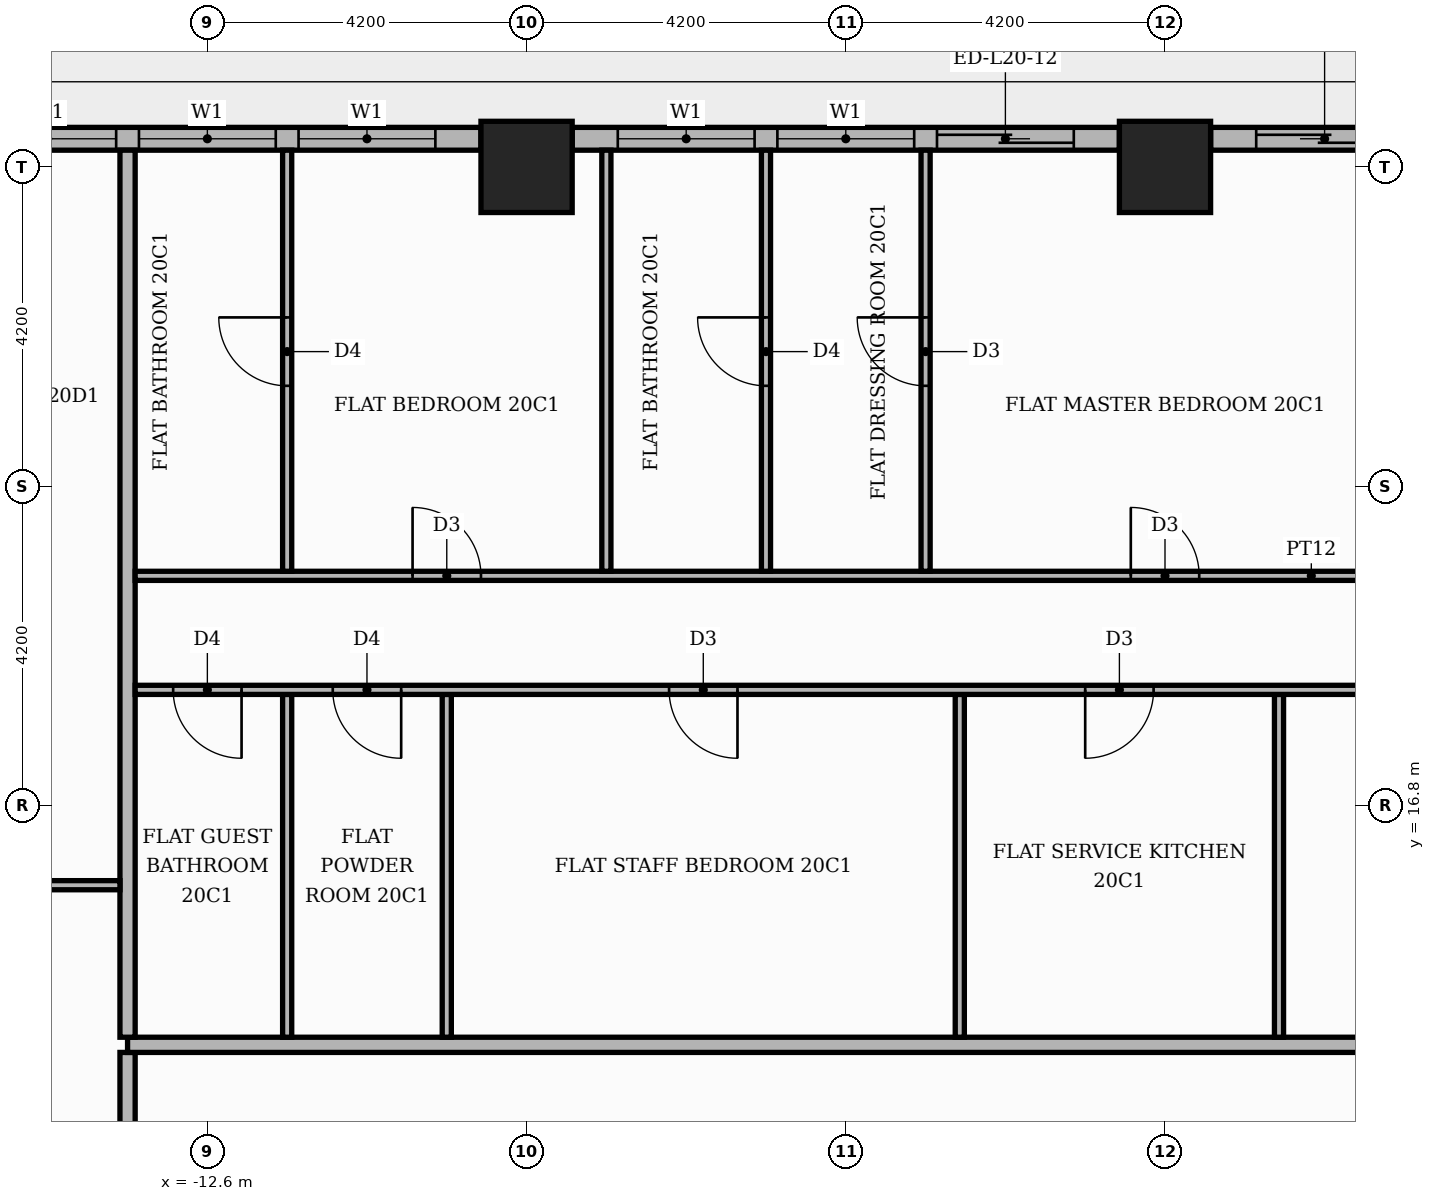
"""IFC4 building model, lengths in metres.
Left out: names, types, materials, properties, quantities, classifications, styles, units other than length and angle.
Written with IfcOpenShell. Run it as: python <this file> out.ifc"""

import sys

from ifc_helpers import new_model, si_unit, direction, frame, frame_2d, origin, origin_2d, place, context, subcontext, project, spatial, rectangle, extrude, element, fill, save


model = new_model("IFC4")
c1 = context("Model", 3, precision=1e-05, world=origin(), true_north=direction((0.0, 1.0)))
c2 = subcontext(c1, "Body", "Model", "MODEL_VIEW")
j1 = project(units=[si_unit("LENGTHUNIT", "METRE"), si_unit("PLANEANGLEUNIT", "RADIAN")], contexts=[c1])
p1 = place(None, origin())
s1 = spatial("IfcSite", under=j1, at=p1, CompositionType="ELEMENT")
p2 = place(p1, origin())
s2 = spatial("IfcBuilding", under=s1, at=p2, CompositionType="ELEMENT")
p3 = place(p2, frame((0.0, 0.0, 87.0)))
s3 = spatial("IfcBuildingStorey", under=s2, at=p3, CompositionType="ELEMENT", Elevation=87.0)
for number, where, z_axis, x_axis in (
    (1, (0.0, 25.2, 0.0), (0.0, 0.0, 1.0), (1.0, 0.0, 0.0)),
    (2, (-8.4, 25.2, 0.0), (0.0, 0.0, 1.0), (1.0, 0.0, 0.0)),
):
    element("IfcColumn", number, at=place(p3, frame(where, z_axis=z_axis, x_axis=x_axis)), inside=s3, PredefinedType="COLUMN", context=c2, shape_type="SweptSolid", body=[
        extrude(rectangle(XDim=1.2, YDim=1.2, at=origin_2d()), origin(), (0.0, 0.0, 1.0), 3.9),
    ])
p4 = place(p3, frame((7.8, 25.57, 0.0), z_axis=(0.0, 0.0, 1.0), x_axis=(-1.0, 0.0, 0.0)))
e3 = element("IfcWall", 3, at=p4, inside=s3, PredefinedType="STANDARD", context=c2, shape_type="SweptSolid", body=[
    extrude(rectangle(XDim=7.2, YDim=0.3, at=frame_2d((3.6, 0.0))), origin(), (0.0, 0.0, 1.0), 3.48),
])
p5 = place(p4, frame((0.6, 0.0, 0.0)))
e4 = element("IfcOpeningElement", 4, at=p5, cuts=e3, PredefinedType="OPENING", context=c2, shape_type="SweptSolid", body=[
    extrude(rectangle(XDim=3.9, YDim=2.4, at=frame_2d((1.95, 1.2))), frame((0.0, 0.16, 0.0), z_axis=(0.0, -1.0, 0.0), x_axis=(1.0, 0.0, 0.0)), (0.0, 0.0, 1.0), 0.32),
])
p6 = place(p4, frame((4.8, 0.0, 0.0)))
e5 = element("IfcOpeningElement", 5, at=p6, cuts=e3, PredefinedType="OPENING", context=c2, shape_type="SweptSolid", body=[
    extrude(rectangle(XDim=1.8, YDim=2.4, at=frame_2d((0.9, 1.2))), frame((0.0, 0.16, 0.0), z_axis=(0.0, -1.0, 0.0), x_axis=(1.0, 0.0, 0.0)), (0.0, 0.0, 1.0), 0.32),
])
p7 = place(p3, frame((-0.6, 25.57, 0.0), z_axis=(0.0, 0.0, 1.0), x_axis=(-1.0, 0.0, 0.0)))
e6 = element("IfcWall", 6, at=p7, inside=s3, PredefinedType="STANDARD", context=c2, shape_type="SweptSolid", body=[
    extrude(rectangle(XDim=7.2, YDim=0.3, at=frame_2d((3.6, 0.0))), origin(), (0.0, 0.0, 1.0), 3.48),
])
p8 = place(p7, frame((0.6, 0.0, 0.0)))
e7 = element("IfcOpeningElement", 7, at=p8, cuts=e6, PredefinedType="OPENING", context=c2, shape_type="SweptSolid", body=[
    extrude(rectangle(XDim=1.8, YDim=2.4, at=frame_2d((0.9, 1.2))), frame((0.0, 0.16, 0.0), z_axis=(0.0, -1.0, 0.0), x_axis=(1.0, 0.0, 0.0)), (0.0, 0.0, 1.0), 0.32),
])
p9 = place(p7, frame((2.7, 0.0, 0.9)))
e8 = element("IfcOpeningElement", 8, at=p9, cuts=e6, PredefinedType="OPENING", context=c2, shape_type="SweptSolid", body=[
    extrude(rectangle(XDim=1.8, YDim=2.1, at=frame_2d((0.9, 1.05))), frame((0.0, 0.16, 0.0), z_axis=(0.0, -1.0, 0.0), x_axis=(1.0, 0.0, 0.0)), (0.0, 0.0, 1.0), 0.32),
])
p10 = place(p7, frame((4.8, 0.0, 0.9)))
e9 = element("IfcOpeningElement", 9, at=p10, cuts=e6, PredefinedType="OPENING", context=c2, shape_type="SweptSolid", body=[
    extrude(rectangle(XDim=1.8, YDim=2.1, at=frame_2d((0.9, 1.05))), frame((0.0, 0.16, 0.0), z_axis=(0.0, -1.0, 0.0), x_axis=(1.0, 0.0, 0.0)), (0.0, 0.0, 1.0), 0.32),
])
p11 = place(p3, frame((-9.0, 25.57, 0.0), z_axis=(0.0, 0.0, 1.0), x_axis=(-1.0, 0.0, 0.0)))
e10 = element("IfcWall", 10, at=p11, inside=s3, PredefinedType="STANDARD", context=c2, shape_type="SweptSolid", body=[
    extrude(rectangle(XDim=7.2, YDim=0.3, at=frame_2d((3.6, 0.0))), origin(), (0.0, 0.0, 1.0), 3.48),
])
p12 = place(p11, frame((0.6, 0.0, 0.9)))
e11 = element("IfcOpeningElement", 11, at=p12, cuts=e10, PredefinedType="OPENING", context=c2, shape_type="SweptSolid", body=[
    extrude(rectangle(XDim=1.8, YDim=2.1, at=frame_2d((0.9, 1.05))), frame((0.0, 0.16, 0.0), z_axis=(0.0, -1.0, 0.0), x_axis=(1.0, 0.0, 0.0)), (0.0, 0.0, 1.0), 0.32),
])
p13 = place(p11, frame((2.7, 0.0, 0.9)))
e12 = element("IfcOpeningElement", 12, at=p13, cuts=e10, PredefinedType="OPENING", context=c2, shape_type="SweptSolid", body=[
    extrude(rectangle(XDim=1.8, YDim=2.1, at=frame_2d((0.9, 1.05))), frame((0.0, 0.16, 0.0), z_axis=(0.0, -1.0, 0.0), x_axis=(1.0, 0.0, 0.0)), (0.0, 0.0, 1.0), 0.32),
])
p14 = place(p11, frame((4.8, 0.0, 0.9)))
e13 = element("IfcOpeningElement", 13, at=p14, cuts=e10, PredefinedType="OPENING", context=c2, shape_type="SweptSolid", body=[
    extrude(rectangle(XDim=1.8, YDim=2.1, at=frame_2d((0.9, 1.05))), frame((0.0, 0.16, 0.0), z_axis=(0.0, -1.0, 0.0), x_axis=(1.0, 0.0, 0.0)), (0.0, 0.0, 1.0), 0.32),
])
p15 = place(p3, frame((-13.65, -13.55, 0.0), z_axis=(0.0, 0.0, 1.0), x_axis=(0.0, 1.0, 0.0)))
e14 = element("IfcWall", 14, at=p15, inside=s3, PredefinedType="PARTITIONING", context=c2, shape_type="SweptSolid", body=[
    extrude(rectangle(XDim=27.1, YDim=0.2, at=frame_2d((13.55, 0.0))), origin(), (0.0, 0.0, 1.0), 3.48),
])
p16 = place(p15, frame((24.55, 0.0, 0.0)))
e15 = element("IfcOpeningElement", 15, at=p16, cuts=e14, PredefinedType="OPENING", context=c2, shape_type="SweptSolid", body=[
    extrude(rectangle(XDim=1.1, YDim=2.4, at=frame_2d((0.55, 1.2))), frame((0.0, 0.11, 0.0), z_axis=(0.0, -1.0, 0.0), x_axis=(1.0, 0.0, 0.0)), (0.0, 0.0, 1.0), 0.22),
])
p17 = place(p3, frame((-13.65, 13.65, 0.0), z_axis=(0.0, 0.0, 1.0), x_axis=(1.0, 0.0, 0.0)))
e16 = element("IfcWall", 16, at=p17, inside=s3, PredefinedType="PARTITIONING", context=c2, shape_type="SweptSolid", body=[
    extrude(rectangle(XDim=39.07, YDim=0.2, at=frame_2d((19.535, 0.0))), origin(), (0.0, 0.0, 1.0), 3.48),
])
p18 = place(p17, frame((23.6, 0.0, 0.0)))
e17 = element("IfcOpeningElement", 17, at=p18, cuts=e16, PredefinedType="OPENING", context=c2, shape_type="SweptSolid", body=[
    extrude(rectangle(XDim=1.1, YDim=2.4, at=frame_2d((0.55, 1.2))), frame((0.0, 0.11, 0.0), z_axis=(0.0, -1.0, 0.0), x_axis=(1.0, 0.0, 0.0)), (0.0, 0.0, 1.0), 0.22),
])
p19 = place(p3, frame((-13.65, 13.75, 0.0), z_axis=(0.0, 0.0, 1.0), x_axis=(0.0, 1.0, 0.0)))
e18 = element("IfcWall", 18, at=p19, inside=s3, PredefinedType="PARTITIONING", context=c2, shape_type="SweptSolid", body=[
    extrude(rectangle(XDim=11.67, YDim=0.2, at=frame_2d((5.835, 0.0))), origin(), (0.0, 0.0, 1.0), 3.48),
])
for number, where, z_axis, x_axis in (
    (19, (-11.55, 13.75, 0.0), (0.0, 0.0, 1.0), (0.0, 1.0, 0.0)),
    (20, (-9.45, 13.75, 0.0), (0.0, 0.0, 1.0), (0.0, 1.0, 0.0)),
    (21, (-2.7, 13.75, 0.0), (0.0, 0.0, 1.0), (0.0, 1.0, 0.0)),
    (22, (1.5, 13.75, 0.0), (0.0, 0.0, 1.0), (0.0, 1.0, 0.0)),
):
    element("IfcWall", number, at=place(p3, frame(where, z_axis=z_axis, x_axis=x_axis)), inside=s3, PredefinedType="PARTITIONING", context=c2, shape_type="SweptSolid", body=[
        extrude(rectangle(XDim=4.51, YDim=0.12, at=frame_2d((2.255, 0.0))), origin(), (0.0, 0.0, 1.0), 3.48),
    ])
p20 = place(p3, frame((-19.82, 15.75, 0.0), z_axis=(0.0, 0.0, 1.0), x_axis=(1.0, 0.0, 0.0)))
e23 = element("IfcWall", 23, at=p20, inside=s3, PredefinedType="PARTITIONING", context=c2, shape_type="SweptSolid", body=[
    extrude(rectangle(XDim=6.07, YDim=0.12, at=frame_2d((3.035, 0.0))), origin(), (0.0, 0.0, 1.0), 3.48),
])
p21 = place(p20, frame((2.635, 0.0, 0.0)))
e24 = element("IfcOpeningElement", 24, at=p21, cuts=e23, PredefinedType="OPENING", context=c2, shape_type="SweptSolid", body=[
    extrude(rectangle(XDim=0.9, YDim=2.1, at=frame_2d((0.45, 1.05))), frame((0.0, 0.07, 0.0), z_axis=(0.0, -1.0, 0.0), x_axis=(1.0, 0.0, 0.0)), (0.0, 0.0, 1.0), 0.14),
])
p22 = place(p3, frame((-13.55, 18.32, 0.0), z_axis=(0.0, 0.0, 1.0), x_axis=(1.0, 0.0, 0.0)))
e25 = element("IfcWall", 25, at=p22, inside=s3, PredefinedType="PARTITIONING", context=c2, shape_type="SweptSolid", body=[
    extrude(rectangle(XDim=20.9, YDim=0.12, at=frame_2d((10.45, 0.0))), origin(), (0.0, 0.0, 1.0), 3.48),
])
p23 = place(p22, frame((17.525, 0.0, 0.0)))
e26 = element("IfcOpeningElement", 26, at=p23, cuts=e25, PredefinedType="OPENING", context=c2, shape_type="SweptSolid", body=[
    extrude(rectangle(XDim=0.9, YDim=2.1, at=frame_2d((0.45, 1.05))), frame((0.0, 0.07, 0.0), z_axis=(0.0, -1.0, 0.0), x_axis=(1.0, 0.0, 0.0)), (0.0, 0.0, 1.0), 0.14),
])
p24 = place(p22, frame((12.5, 0.0, 0.0)))
e27 = element("IfcOpeningElement", 27, at=p24, cuts=e25, PredefinedType="OPENING", context=c2, shape_type="SweptSolid", body=[
    extrude(rectangle(XDim=0.9, YDim=2.1, at=frame_2d((0.45, 1.05))), frame((0.0, 0.07, 0.0), z_axis=(0.0, -1.0, 0.0), x_axis=(1.0, 0.0, 0.0)), (0.0, 0.0, 1.0), 0.14),
])
p25 = place(p22, frame((7.025, 0.0, 0.0)))
e28 = element("IfcOpeningElement", 28, at=p25, cuts=e25, PredefinedType="OPENING", context=c2, shape_type="SweptSolid", body=[
    extrude(rectangle(XDim=0.9, YDim=2.1, at=frame_2d((0.45, 1.05))), frame((0.0, 0.07, 0.0), z_axis=(0.0, -1.0, 0.0), x_axis=(1.0, 0.0, 0.0)), (0.0, 0.0, 1.0), 0.14),
])
p26 = place(p22, frame((2.6, 0.0, 0.0)))
e29 = element("IfcOpeningElement", 29, at=p26, cuts=e25, PredefinedType="OPENING", context=c2, shape_type="SweptSolid", body=[
    extrude(rectangle(XDim=0.9, YDim=2.1, at=frame_2d((0.45, 1.05))), frame((0.0, 0.07, 0.0), z_axis=(0.0, -1.0, 0.0), x_axis=(1.0, 0.0, 0.0)), (0.0, 0.0, 1.0), 0.14),
])
p27 = place(p22, frame((0.5, 0.0, 0.0)))
e30 = element("IfcOpeningElement", 30, at=p27, cuts=e25, PredefinedType="OPENING", context=c2, shape_type="SweptSolid", body=[
    extrude(rectangle(XDim=0.9, YDim=2.1, at=frame_2d((0.45, 1.05))), frame((0.0, 0.07, 0.0), z_axis=(0.0, -1.0, 0.0), x_axis=(1.0, 0.0, 0.0)), (0.0, 0.0, 1.0), 0.14),
])
p28 = place(p3, frame((-13.55, 19.82, 0.0), z_axis=(0.0, 0.0, 1.0), x_axis=(1.0, 0.0, 0.0)))
e31 = element("IfcWall", 31, at=p28, inside=s3, PredefinedType="PARTITIONING", context=c2, shape_type="SweptSolid", body=[
    extrude(rectangle(XDim=30.95, YDim=0.12, at=frame_2d((15.475, 0.0))), origin(), (0.0, 0.0, 1.0), 3.48),
])
p29 = place(p28, frame((25.65, 0.0, 0.0)))
e32 = element("IfcOpeningElement", 32, at=p29, cuts=e31, PredefinedType="OPENING", context=c2, shape_type="SweptSolid", body=[
    extrude(rectangle(XDim=1.0, YDim=2.1, at=frame_2d((0.5, 1.05))), frame((0.0, 0.07, 0.0), z_axis=(0.0, -1.0, 0.0), x_axis=(1.0, 0.0, 0.0)), (0.0, 0.0, 1.0), 0.14),
])
p30 = place(p28, frame((20.4, 0.0, 0.0)))
e33 = element("IfcOpeningElement", 33, at=p30, cuts=e31, PredefinedType="OPENING", context=c2, shape_type="SweptSolid", body=[
    extrude(rectangle(XDim=1.0, YDim=2.1, at=frame_2d((0.5, 1.05))), frame((0.0, 0.07, 0.0), z_axis=(0.0, -1.0, 0.0), x_axis=(1.0, 0.0, 0.0)), (0.0, 0.0, 1.0), 0.14),
])
p31 = place(p28, frame((13.1, 0.0, 0.0)))
e34 = element("IfcOpeningElement", 34, at=p31, cuts=e31, PredefinedType="OPENING", context=c2, shape_type="SweptSolid", body=[
    extrude(rectangle(XDim=0.9, YDim=2.1, at=frame_2d((0.45, 1.05))), frame((0.0, 0.07, 0.0), z_axis=(0.0, -1.0, 0.0), x_axis=(1.0, 0.0, 0.0)), (0.0, 0.0, 1.0), 0.14),
])
p32 = place(p28, frame((3.65, 0.0, 0.0)))
e35 = element("IfcOpeningElement", 35, at=p32, cuts=e31, PredefinedType="OPENING", context=c2, shape_type="SweptSolid", body=[
    extrude(rectangle(XDim=0.9, YDim=2.1, at=frame_2d((0.45, 1.05))), frame((0.0, 0.07, 0.0), z_axis=(0.0, -1.0, 0.0), x_axis=(1.0, 0.0, 0.0)), (0.0, 0.0, 1.0), 0.14),
])
p33 = place(p3, frame((-11.55, 19.88, 0.0), z_axis=(0.0, 0.0, 1.0), x_axis=(0.0, 1.0, 0.0)))
e36 = element("IfcWall", 36, at=p33, inside=s3, PredefinedType="PARTITIONING", context=c2, shape_type="SweptSolid", body=[
    extrude(rectangle(XDim=5.54, YDim=0.12, at=frame_2d((2.77, 0.0))), origin(), (0.0, 0.0, 1.0), 3.48),
])
p34 = place(p33, frame((2.44, 0.0, 0.0)))
e37 = element("IfcOpeningElement", 37, at=p34, cuts=e36, PredefinedType="OPENING", context=c2, shape_type="SweptSolid", body=[
    extrude(rectangle(XDim=0.9, YDim=2.1, at=frame_2d((0.45, 1.05))), frame((0.0, 0.07, 0.0), z_axis=(0.0, -1.0, 0.0), x_axis=(1.0, 0.0, 0.0)), (0.0, 0.0, 1.0), 0.14),
])
p35 = place(p3, frame((-7.35, 19.88, 0.0), z_axis=(0.0, 0.0, 1.0), x_axis=(0.0, 1.0, 0.0)))
e38 = element("IfcWall", 38, at=p35, inside=s3, PredefinedType="PARTITIONING", context=c2, shape_type="SweptSolid", body=[
    extrude(rectangle(XDim=5.54, YDim=0.12, at=frame_2d((2.77, 0.0))), origin(), (0.0, 0.0, 1.0), 3.48),
])
p36 = place(p3, frame((-5.25, 19.88, 0.0), z_axis=(0.0, 0.0, 1.0), x_axis=(0.0, 1.0, 0.0)))
e39 = element("IfcWall", 39, at=p36, inside=s3, PredefinedType="PARTITIONING", context=c2, shape_type="SweptSolid", body=[
    extrude(rectangle(XDim=5.54, YDim=0.12, at=frame_2d((2.77, 0.0))), origin(), (0.0, 0.0, 1.0), 3.48),
])
p37 = place(p36, frame((2.44, 0.0, 0.0)))
e40 = element("IfcOpeningElement", 40, at=p37, cuts=e39, PredefinedType="OPENING", context=c2, shape_type="SweptSolid", body=[
    extrude(rectangle(XDim=0.9, YDim=2.1, at=frame_2d((0.45, 1.05))), frame((0.0, 0.07, 0.0), z_axis=(0.0, -1.0, 0.0), x_axis=(1.0, 0.0, 0.0)), (0.0, 0.0, 1.0), 0.14),
])
p38 = place(p3, frame((-3.15, 19.88, 0.0), z_axis=(0.0, 0.0, 1.0), x_axis=(0.0, 1.0, 0.0)))
e41 = element("IfcWall", 41, at=p38, inside=s3, PredefinedType="PARTITIONING", context=c2, shape_type="SweptSolid", body=[
    extrude(rectangle(XDim=5.54, YDim=0.12, at=frame_2d((2.77, 0.0))), origin(), (0.0, 0.0, 1.0), 3.48),
])
p39 = place(p38, frame((2.44, 0.0, 0.0)))
e42 = element("IfcOpeningElement", 42, at=p39, cuts=e41, PredefinedType="OPENING", context=c2, shape_type="SweptSolid", body=[
    extrude(rectangle(XDim=0.9, YDim=2.1, at=frame_2d((0.45, 1.05))), frame((0.0, 0.07, 0.0), z_axis=(0.0, -1.0, 0.0), x_axis=(1.0, 0.0, 0.0)), (0.0, 0.0, 1.0), 0.14),
])
p40 = place(p6, origin())
e43 = element("IfcDoor", 43, at=p40, inside=s3, OperationType="SLIDING_TO_RIGHT", PredefinedType="DOOR", context=c2, shape_type="SweptSolid", body=[
    extrude(rectangle(XDim=1.8, YDim=2.4, at=frame_2d((0.9, 1.2))), frame((0.0, 0.025, 0.0), z_axis=(0.0, -1.0, 0.0), x_axis=(1.0, 0.0, 0.0)), (0.0, 0.0, 1.0), 0.05),
])
fill(e5, e43)
p41 = place(p8, origin())
e44 = element("IfcDoor", 44, at=p41, inside=s3, OperationType="SLIDING_TO_LEFT", PredefinedType="DOOR", context=c2, shape_type="SweptSolid", body=[
    extrude(rectangle(XDim=1.8, YDim=2.4, at=frame_2d((0.9, 1.2))), frame((0.0, 0.025, 0.0), z_axis=(0.0, -1.0, 0.0), x_axis=(1.0, 0.0, 0.0)), (0.0, 0.0, 1.0), 0.05),
])
fill(e7, e44)
p42 = place(p9, origin())
e45 = element("IfcWindow", 45, at=p42, inside=s3, PartitioningType="SINGLE_PANEL", PredefinedType="WINDOW", context=c2, shape_type="SweptSolid", body=[
    extrude(rectangle(XDim=1.8, YDim=2.1, at=frame_2d((0.9, 1.05))), frame((0.0, 0.03, 0.0), z_axis=(0.0, -1.0, 0.0), x_axis=(1.0, 0.0, 0.0)), (0.0, 0.0, 1.0), 0.06),
])
fill(e8, e45)
p43 = place(p10, origin())
e46 = element("IfcWindow", 46, at=p43, inside=s3, PartitioningType="SINGLE_PANEL", PredefinedType="WINDOW", context=c2, shape_type="SweptSolid", body=[
    extrude(rectangle(XDim=1.8, YDim=2.1, at=frame_2d((0.9, 1.05))), frame((0.0, 0.03, 0.0), z_axis=(0.0, -1.0, 0.0), x_axis=(1.0, 0.0, 0.0)), (0.0, 0.0, 1.0), 0.06),
])
fill(e9, e46)
p44 = place(p12, origin())
e47 = element("IfcWindow", 47, at=p44, inside=s3, PartitioningType="SINGLE_PANEL", PredefinedType="WINDOW", context=c2, shape_type="SweptSolid", body=[
    extrude(rectangle(XDim=1.8, YDim=2.1, at=frame_2d((0.9, 1.05))), frame((0.0, 0.03, 0.0), z_axis=(0.0, -1.0, 0.0), x_axis=(1.0, 0.0, 0.0)), (0.0, 0.0, 1.0), 0.06),
])
fill(e11, e47)
p45 = place(p13, origin())
e48 = element("IfcWindow", 48, at=p45, inside=s3, PartitioningType="SINGLE_PANEL", PredefinedType="WINDOW", context=c2, shape_type="SweptSolid", body=[
    extrude(rectangle(XDim=1.8, YDim=2.1, at=frame_2d((0.9, 1.05))), frame((0.0, 0.03, 0.0), z_axis=(0.0, -1.0, 0.0), x_axis=(1.0, 0.0, 0.0)), (0.0, 0.0, 1.0), 0.06),
])
fill(e12, e48)
p46 = place(p14, origin())
e49 = element("IfcWindow", 49, at=p46, inside=s3, PartitioningType="SINGLE_PANEL", PredefinedType="WINDOW", context=c2, shape_type="SweptSolid", body=[
    extrude(rectangle(XDim=1.8, YDim=2.1, at=frame_2d((0.9, 1.05))), frame((0.0, 0.03, 0.0), z_axis=(0.0, -1.0, 0.0), x_axis=(1.0, 0.0, 0.0)), (0.0, 0.0, 1.0), 0.06),
])
fill(e13, e49)
p47 = place(p24, frame((0.9, 0.0, 0.0), z_axis=(0.0, 0.0, 1.0), x_axis=(-1.0, 0.0, 0.0)))
e50 = element("IfcDoor", 50, at=p47, inside=s3, OperationType="SINGLE_SWING_LEFT", PredefinedType="DOOR", context=c2, shape_type="SweptSolid", body=[
    extrude(rectangle(XDim=0.9, YDim=2.1, at=frame_2d((0.45, 1.05))), frame((0.0, 0.025, 0.0), z_axis=(0.0, -1.0, 0.0), x_axis=(1.0, 0.0, 0.0)), (0.0, 0.0, 1.0), 0.05),
])
fill(e27, e50)
p48 = place(p25, frame((0.9, 0.0, 0.0), z_axis=(0.0, 0.0, 1.0), x_axis=(-1.0, 0.0, 0.0)))
e51 = element("IfcDoor", 51, at=p48, inside=s3, OperationType="SINGLE_SWING_RIGHT", PredefinedType="DOOR", context=c2, shape_type="SweptSolid", body=[
    extrude(rectangle(XDim=0.9, YDim=2.1, at=frame_2d((0.45, 1.05))), frame((0.0, 0.025, 0.0), z_axis=(0.0, -1.0, 0.0), x_axis=(1.0, 0.0, 0.0)), (0.0, 0.0, 1.0), 0.05),
])
fill(e28, e51)
p49 = place(p26, frame((0.9, 0.0, 0.0), z_axis=(0.0, 0.0, 1.0), x_axis=(-1.0, 0.0, 0.0)))
e52 = element("IfcDoor", 52, at=p49, inside=s3, OperationType="SINGLE_SWING_RIGHT", PredefinedType="DOOR", context=c2, shape_type="SweptSolid", body=[
    extrude(rectangle(XDim=0.9, YDim=2.1, at=frame_2d((0.45, 1.05))), frame((0.0, 0.025, 0.0), z_axis=(0.0, -1.0, 0.0), x_axis=(1.0, 0.0, 0.0)), (0.0, 0.0, 1.0), 0.05),
])
fill(e29, e52)
p50 = place(p27, frame((0.9, 0.0, 0.0), z_axis=(0.0, 0.0, 1.0), x_axis=(-1.0, 0.0, 0.0)))
e53 = element("IfcDoor", 53, at=p50, inside=s3, OperationType="SINGLE_SWING_RIGHT", PredefinedType="DOOR", context=c2, shape_type="SweptSolid", body=[
    extrude(rectangle(XDim=0.9, YDim=2.1, at=frame_2d((0.45, 1.05))), frame((0.0, 0.025, 0.0), z_axis=(0.0, -1.0, 0.0), x_axis=(1.0, 0.0, 0.0)), (0.0, 0.0, 1.0), 0.05),
])
fill(e30, e53)
p51 = place(p31, origin())
e54 = element("IfcDoor", 54, at=p51, inside=s3, OperationType="SINGLE_SWING_LEFT", PredefinedType="DOOR", context=c2, shape_type="SweptSolid", body=[
    extrude(rectangle(XDim=0.9, YDim=2.1, at=frame_2d((0.45, 1.05))), frame((0.0, 0.025, 0.0), z_axis=(0.0, -1.0, 0.0), x_axis=(1.0, 0.0, 0.0)), (0.0, 0.0, 1.0), 0.05),
])
fill(e34, e54)
p52 = place(p39, origin())
e55 = element("IfcDoor", 55, at=p52, inside=s3, OperationType="SINGLE_SWING_RIGHT", PredefinedType="DOOR", context=c2, shape_type="SweptSolid", body=[
    extrude(rectangle(XDim=0.9, YDim=2.1, at=frame_2d((0.45, 1.05))), frame((0.0, 0.025, 0.0), z_axis=(0.0, -1.0, 0.0), x_axis=(1.0, 0.0, 0.0)), (0.0, 0.0, 1.0), 0.05),
])
fill(e42, e55)
p53 = place(p37, origin())
e56 = element("IfcDoor", 56, at=p53, inside=s3, OperationType="SINGLE_SWING_RIGHT", PredefinedType="DOOR", context=c2, shape_type="SweptSolid", body=[
    extrude(rectangle(XDim=0.9, YDim=2.1, at=frame_2d((0.45, 1.05))), frame((0.0, 0.025, 0.0), z_axis=(0.0, -1.0, 0.0), x_axis=(1.0, 0.0, 0.0)), (0.0, 0.0, 1.0), 0.05),
])
fill(e40, e56)
p54 = place(p32, origin())
e57 = element("IfcDoor", 57, at=p54, inside=s3, OperationType="SINGLE_SWING_LEFT", PredefinedType="DOOR", context=c2, shape_type="SweptSolid", body=[
    extrude(rectangle(XDim=0.9, YDim=2.1, at=frame_2d((0.45, 1.05))), frame((0.0, 0.025, 0.0), z_axis=(0.0, -1.0, 0.0), x_axis=(1.0, 0.0, 0.0)), (0.0, 0.0, 1.0), 0.05),
])
fill(e35, e57)
p55 = place(p34, origin())
e58 = element("IfcDoor", 58, at=p55, inside=s3, OperationType="SINGLE_SWING_RIGHT", PredefinedType="DOOR", context=c2, shape_type="SweptSolid", body=[
    extrude(rectangle(XDim=0.9, YDim=2.1, at=frame_2d((0.45, 1.05))), frame((0.0, 0.025, 0.0), z_axis=(0.0, -1.0, 0.0), x_axis=(1.0, 0.0, 0.0)), (0.0, 0.0, 1.0), 0.05),
])
fill(e37, e58)
save(model, sys.argv[1])
